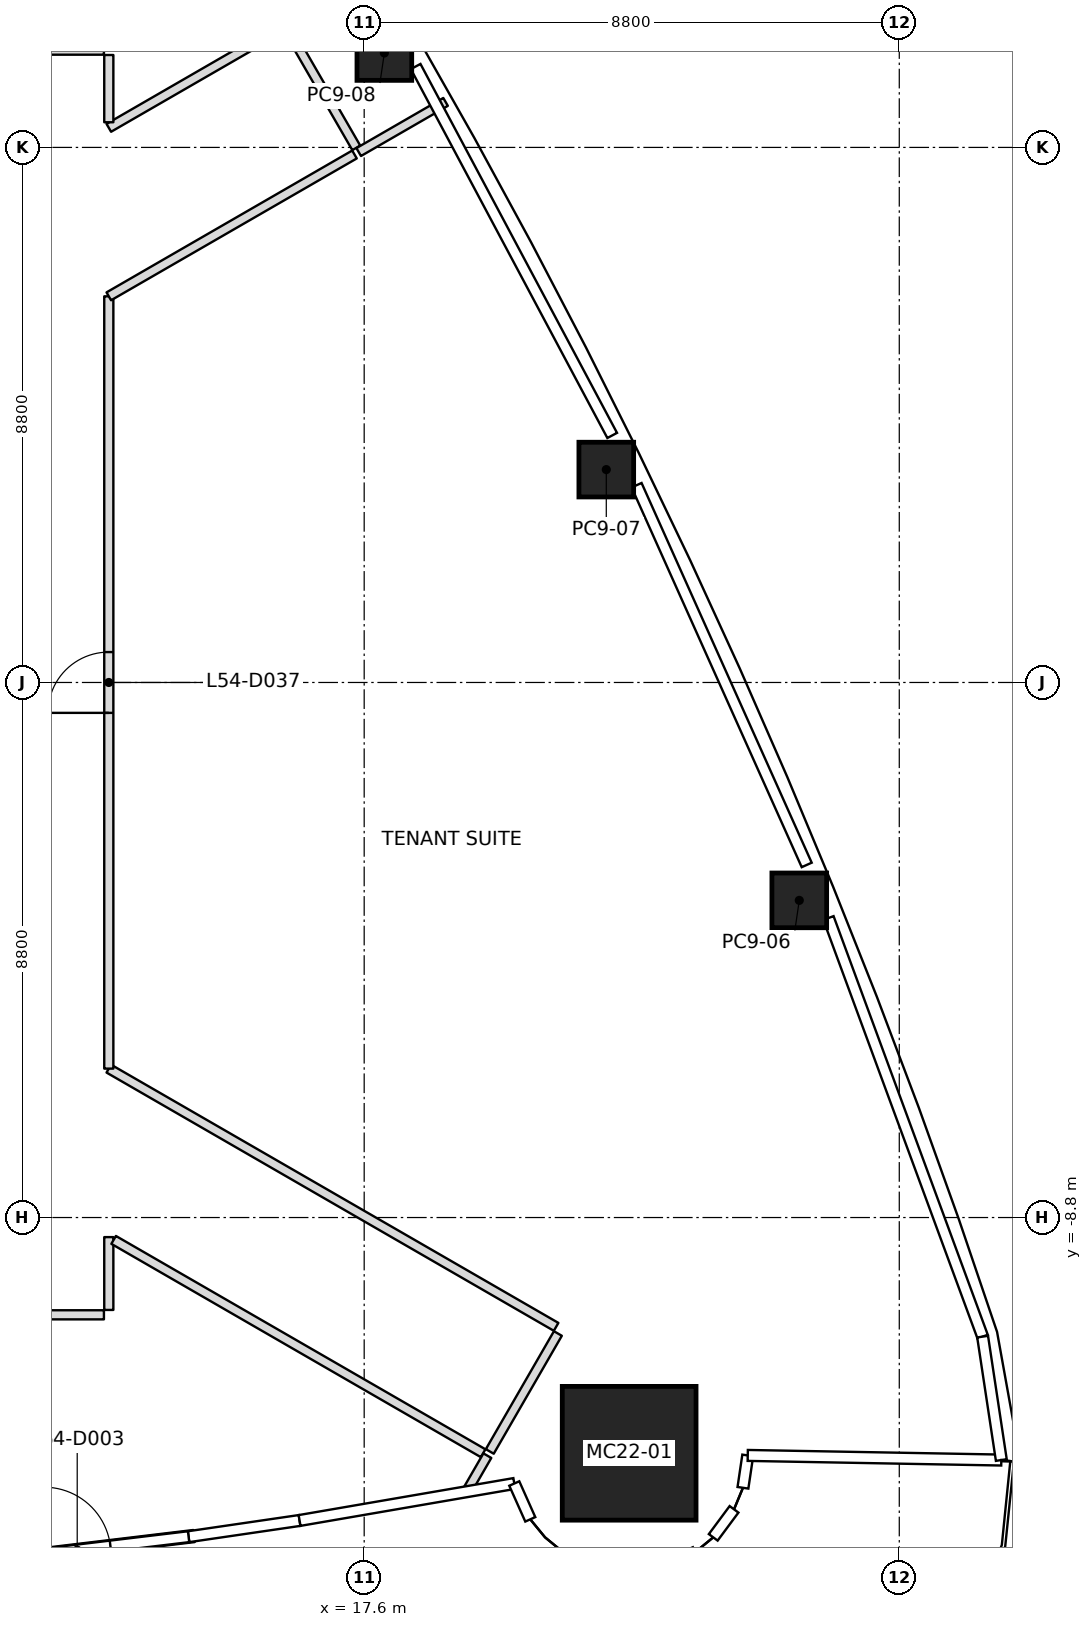
"""IFC4 building model, lengths in metres.
Left out: names, types, materials, properties, quantities, classifications, styles, units other than length and angle.
Written with IfcOpenShell. Run it as: python <this file> out.ifc"""

import sys

from ifc_helpers import new_model, si_unit, direction, frame, frame_2d, origin, origin_2d, place, context, subcontext, project, spatial, rectangle, extrude, element, fill, save


model = new_model("IFC4")
c1 = context("Model", 3, precision=1e-05, world=origin(), true_north=direction((0.0, 1.0)))
c2 = subcontext(c1, "Body", "Model", "MODEL_VIEW")
j1 = project(units=[si_unit("LENGTHUNIT", "METRE"), si_unit("PLANEANGLEUNIT", "RADIAN")], contexts=[c1])
p1 = place(None, origin())
s1 = spatial("IfcSite", under=j1, at=p1, CompositionType="ELEMENT")
p2 = place(p1, origin())
s2 = spatial("IfcBuilding", under=s1, at=p2, CompositionType="ELEMENT")
p3 = place(p2, frame((0.0, 0.0, 243.0)))
s3 = spatial("IfcBuildingStorey", under=s2, at=p3, CompositionType="ELEMENT", Elevation=243.0)
p4 = place(p3, frame((21.958, -12.677, 0.0), z_axis=(-0.027817649629, 0.016104955049, 0.999483270892), x_axis=(0.999613014306, 0.000448175434, 0.027814039075)))
e1 = element("IfcColumn", 1, at=p4, inside=s3, PredefinedType="COLUMN", context=c2, shape_type="SweptSolid", body=[
    extrude(rectangle(XDim=2.2, YDim=2.2, at=origin_2d()), origin(), (0.0, 0.0, 1.0), 4.002),
])
p5 = place(p3, frame((24.755, -3.584, 0.0), z_axis=(-0.017818554314, 0.009946658744, 0.999791759869), x_axis=(-0.37737522462, 0.925923289351, -0.015937442734)))
e2 = element("IfcColumn", 2, at=p5, inside=s3, PredefinedType="COLUMN", context=c2, shape_type="SweptSolid", body=[
    extrude(rectangle(XDim=0.9, YDim=0.9, at=origin_2d()), origin(), (0.0, 0.0, 1.0), 4.001),
])
p6 = place(p3, frame((21.582, 3.501, 0.0), z_axis=(-0.014036676147, 0.001952928855, 0.999899573853), x_axis=(-0.439698349735, 0.898110533027, -0.007926645355)))
e3 = element("IfcColumn", 3, at=p6, inside=s3, PredefinedType="COLUMN", context=c2, shape_type="SweptSolid", body=[
    extrude(rectangle(XDim=0.9, YDim=0.9, at=origin_2d()), origin(), (0.0, 0.0, 1.0), 4.0),
])
p7 = place(p3, frame((17.932, 10.353, 0.0), z_axis=(-0.009887052741, -0.005675900648, 0.999935013058), x_axis=(-0.49997556095, 0.866039512773, -2.7732311e-05)))
e4 = element("IfcColumn", 4, at=p7, inside=s3, PredefinedType="COLUMN", context=c2, shape_type="SweptSolid", body=[
    extrude(rectangle(XDim=0.9, YDim=0.9, at=origin_2d()), origin(), (0.0, 0.0, 1.0), 4.0),
])
p8 = place(p3, frame((10.96, -14.5, 0.0), z_axis=(0.0, 0.0, 1.0), x_axis=(0.992871762076, 0.119187516431, 0.0)))
e5 = element("IfcWall", 5, at=p8, inside=s3, PredefinedType="SOLIDWALL", context=c2, shape_type="SweptSolid", body=[
    extrude(rectangle(XDim=3.869, YDim=0.2, at=frame_2d((1.935, 0.0))), origin(), (0.0, 0.0, 1.0), 3.34),
])
p9 = place(p8, frame((1.385, 0.0, 0.0)))
e6 = element("IfcOpeningElement", 6, at=p9, cuts=e5, PredefinedType="OPENING", context=c2, shape_type="SweptSolid", body=[
    extrude(rectangle(XDim=1.1, YDim=2.1, at=frame_2d((0.55, 1.05))), frame((0.0, 0.1, 0.0), z_axis=(0.0, -1.0, 0.0), x_axis=(1.0, 0.0, 0.0)), (0.0, 0.0, 1.0), 0.2),
])
p10 = place(p3, frame((18.938, 9.549, 0.0), z_axis=(0.0, 0.0, 1.0), x_axis=(-0.866003217194, -0.500038426333, 0.0)))
e7 = element("IfcWall", 7, at=p10, inside=s3, PredefinedType="PARTITIONING", context=c2, shape_type="SweptSolid", body=[
    extrude(rectangle(XDim=1.65, YDim=0.15, at=frame_2d((0.825, 0.0))), origin(), (0.0, 0.0, 1.0), 3.234),
])
p11 = place(p3, frame((19.625, -12.717, 0.0), z_axis=(0.0, 0.0, 1.0), x_axis=(-0.499996383721, -0.866027491634, 0.0)))
e8 = element("IfcWall", 8, at=p11, inside=s3, PredefinedType="PARTITIONING", context=c2, shape_type="SweptSolid", body=[
    extrude(rectangle(XDim=0.694, YDim=0.15, at=frame_2d((0.347, 0.0))), origin(), (0.0, 0.0, 1.0), 3.45),
])
p12 = place(p3, frame((1.2, -10.4, 0.0), z_axis=(0.0, 0.0, 1.0), x_axis=(1.0, 0.0, 0.0)))
e9 = element("IfcWall", 9, at=p12, inside=s3, PredefinedType="PARTITIONING", context=c2, shape_type="SweptSolid", body=[
    extrude(rectangle(XDim=12.12, YDim=0.15, at=frame_2d((6.06, 0.0))), origin(), (0.0, 0.0, 1.0), 3.317),
])
p13 = place(p12, frame((5.6, 0.0, 0.0)))
e10 = element("IfcOpeningElement", 10, at=p13, cuts=e9, PredefinedType="OPENING", context=c2, shape_type="SweptSolid", body=[
    extrude(rectangle(XDim=1.0, YDim=2.1, at=frame_2d((0.5, 1.05))), frame((0.0, 0.075, 0.0), z_axis=(0.0, -1.0, 0.0), x_axis=(1.0, 0.0, 0.0)), (0.0, 0.0, 1.0), 0.15),
])
p14 = place(p3, frame((13.32, 10.4, 0.0), z_axis=(0.0, 0.0, 1.0), x_axis=(-1.0, 0.0, 0.0)))
e11 = element("IfcWall", 11, at=p14, inside=s3, PredefinedType="PARTITIONING", context=c2, shape_type="SweptSolid", body=[
    extrude(rectangle(XDim=2.62, YDim=0.15, at=frame_2d((1.31, 0.0))), origin(), (0.0, 0.0, 1.0), 3.45),
])
p15 = place(p3, frame((13.4, -10.32, 0.0), z_axis=(0.0, 0.0, 1.0), x_axis=(0.0, 1.0, 0.0)))
e12 = element("IfcWall", 12, at=p15, inside=s3, PredefinedType="PARTITIONING", context=c2, shape_type="SweptSolid", body=[
    extrude(rectangle(XDim=1.198, YDim=0.15, at=frame_2d((0.599, 0.0))), origin(), (0.0, 0.0, 1.0), 3.233),
])
p16 = place(p3, frame((13.479, -9.168, 0.0), z_axis=(0.0, 0.0, 1.0), x_axis=(0.866031473494, -0.499989486807, 0.0)))
e13 = element("IfcWall", 13, at=p16, inside=s3, PredefinedType="PARTITIONING", context=c2, shape_type="SweptSolid", body=[
    extrude(rectangle(XDim=7.017, YDim=0.15, at=frame_2d((3.509, 0.0))), origin(), (0.0, 0.0, 1.0), 3.233),
])
p17 = place(p3, frame((16.24, 10.762, 0.0), z_axis=(0.0, 0.0, 1.0), x_axis=(-0.866008333849, -0.50002956483, 0.0)))
e14 = element("IfcWall", 14, at=p17, inside=s3, PredefinedType="PARTITIONING", context=c2, shape_type="SweptSolid", body=[
    extrude(rectangle(XDim=3.28, YDim=0.15, at=frame_2d((1.64, 0.0))), origin(), (0.0, 0.0, 1.0), 3.45),
])
p18 = place(p3, frame((13.4, 9.214, 0.0), z_axis=(0.0, 0.0, 1.0), x_axis=(0.0, 1.0, 0.0)))
e15 = element("IfcWall", 15, at=p18, inside=s3, PredefinedType="PARTITIONING", context=c2, shape_type="SweptSolid", body=[
    extrude(rectangle(XDim=1.106, YDim=0.15, at=frame_2d((0.553, 0.0))), origin(), (0.0, 0.0, 1.0), 3.45),
])
p19 = place(p3, frame((17.47, 8.793, 0.0), z_axis=(0.0, 0.0, 1.0), x_axis=(-0.49994888933, 0.866054910533, 0.0)))
e16 = element("IfcWall", 16, at=p19, inside=s3, PredefinedType="PARTITIONING", context=c2, shape_type="SweptSolid", body=[
    extrude(rectangle(XDim=2.24, YDim=0.15, at=frame_2d((1.12, 0.0))), origin(), (0.0, 0.0, 1.0), 3.45),
])
p20 = place(p3, frame((20.756, -10.598, 0.0), z_axis=(0.0, 0.0, 1.0), x_axis=(-0.866034343295, 0.499984515995, 0.0)))
e17 = element("IfcWall", 17, at=p20, inside=s3, PredefinedType="PARTITIONING", context=c2, shape_type="SweptSolid", body=[
    extrude(rectangle(XDim=8.494, YDim=0.15, at=frame_2d((4.247, 0.0))), origin(), (0.0, 0.0, 1.0), 3.317),
])
p21 = place(p3, frame((13.4, -6.351, 0.0), z_axis=(0.0, 0.0, 1.0), x_axis=(0.0, 1.0, 0.0)))
e18 = element("IfcWall", 18, at=p21, inside=s3, PredefinedType="PARTITIONING", context=c2, shape_type="SweptSolid", body=[
    extrude(rectangle(XDim=12.702, YDim=0.15, at=frame_2d((6.351, 0.0))), origin(), (0.0, 0.0, 1.0), 3.317),
])
p22 = place(p21, frame((5.851, 0.0, 0.0)))
e19 = element("IfcOpeningElement", 19, at=p22, cuts=e18, PredefinedType="OPENING", context=c2, shape_type="SweptSolid", body=[
    extrude(rectangle(XDim=1.0, YDim=2.1, at=frame_2d((0.5, 1.05))), frame((0.0, 0.075, 0.0), z_axis=(0.0, -1.0, 0.0), x_axis=(1.0, 0.0, 0.0)), (0.0, 0.0, 1.0), 0.15),
])
p23 = place(p3, frame((13.4, 6.351, 0.0), z_axis=(0.0, 0.0, 1.0), x_axis=(0.866028733576, 0.499994232587, 0.0)))
e20 = element("IfcWall", 20, at=p23, inside=s3, PredefinedType="PARTITIONING", context=c2, shape_type="SweptSolid", body=[
    extrude(rectangle(XDim=4.666, YDim=0.15, at=frame_2d((2.333, 0.0))), origin(), (0.0, 0.0, 1.0), 3.45),
])
p24 = place(p3, frame((19.666, -12.647, 0.0), z_axis=(0.0, 0.0, 1.0), x_axis=(0.500030632641, 0.866007717299, 0.0)))
e21 = element("IfcWall", 21, at=p24, inside=s3, PredefinedType="PARTITIONING", context=c2, shape_type="SweptSolid", body=[
    extrude(rectangle(XDim=2.24, YDim=0.15, at=frame_2d((1.12, 0.0))), origin(), (0.0, 0.0, 1.0), 3.233),
])
p25 = place(p9, origin())
e22 = element("IfcDoor", 22, at=p25, inside=s3, OperationType="SINGLE_SWING_RIGHT", PredefinedType="DOOR", context=c2, shape_type="SweptSolid", body=[
    extrude(rectangle(XDim=1.1, YDim=2.1, at=frame_2d((0.55, 1.05))), frame((0.0, 0.025, 0.0), z_axis=(0.0, -1.0, 0.0), x_axis=(1.0, 0.0, 0.0)), (0.0, 0.0, 1.0), 0.05),
])
fill(e6, e22)
p26 = place(p22, origin())
e23 = element("IfcDoor", 23, at=p26, inside=s3, OperationType="SINGLE_SWING_RIGHT", PredefinedType="DOOR", context=c2, shape_type="SweptSolid", body=[
    extrude(rectangle(XDim=1.0, YDim=2.1, at=frame_2d((0.5, 1.05))), frame((0.0, 0.025, 0.0), z_axis=(0.0, -1.0, 0.0), x_axis=(1.0, 0.0, 0.0)), (0.0, 0.0, 1.0), 0.05),
])
fill(e19, e23)
save(model, sys.argv[1])
